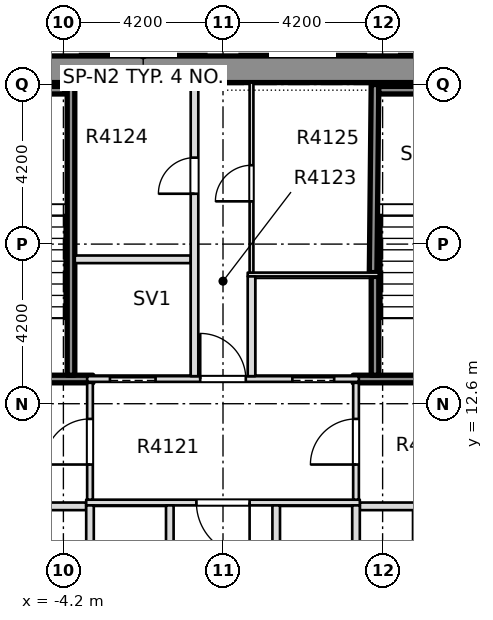
"""IFC4 building model, lengths in metres.
Left out: names, types, materials, properties, quantities, classifications, styles, units other than length and angle.
Written with IfcOpenShell. Run it as: python <this file> out.ifc"""

import sys

from ifc_helpers import new_model, si_unit, direction, frame, frame_2d, origin, place, context, subcontext, project, spatial, rectangle, extrude, element, fill, save


model = new_model("IFC4")
c1 = context("Model", 3, precision=1e-05, world=origin(), true_north=direction((0.0, 1.0)))
c2 = subcontext(c1, "Body", "Model", "MODEL_VIEW")
j1 = project(units=[si_unit("LENGTHUNIT", "METRE"), si_unit("PLANEANGLEUNIT", "RADIAN")], contexts=[c1])
p1 = place(None, origin())
s1 = spatial("IfcSite", under=j1, at=p1, CompositionType="ELEMENT")
p2 = place(p1, origin())
s2 = spatial("IfcBuilding", under=s1, at=p2, CompositionType="ELEMENT")
p3 = place(p2, frame((0.0, 0.0, 160.7)))
s3 = spatial("IfcBuildingStorey", under=s2, at=p3, CompositionType="ELEMENT", Elevation=160.7)
p4 = place(p3, frame((-7.7, 21.4, -0.4), z_axis=(0.0, 0.0, 1.0), x_axis=(1.0, 0.0, 0.0)))
e1 = element("IfcWall", 1, at=p4, inside=s3, PredefinedType="SHEAR", context=c2, shape_type="SweptSolid", body=[
    extrude(rectangle(XDim=15.4, YDim=0.7, at=frame_2d((7.7, 0.0))), origin(), (0.0, 0.0, 1.0), 3.45),
])
p5 = place(p3, frame((-7.699, 9.9, 0.0), z_axis=(0.0, 0.0, 1.0), x_axis=(1.0, 0.0, 0.0)))
e2 = element("IfcWall", 2, at=p5, inside=s3, PredefinedType="PARTITIONING", context=c2, shape_type="SweptSolid", body=[
    extrude(rectangle(XDim=4.099, YDim=0.2, at=frame_2d((2.049, 0.0))), origin(), (0.0, 0.0, 1.0), 3.05),
])
p6 = place(p5, frame((0.749, 0.0, 0.0)))
e3 = element("IfcOpeningElement", 3, at=p6, cuts=e2, PredefinedType="OPENING", context=c2, shape_type="SweptSolid", body=[
    extrude(rectangle(XDim=1.1, YDim=2.1, at=frame_2d((0.55, 1.05))), frame((0.0, 0.11, 0.0), z_axis=(0.0, -1.0, 0.0), x_axis=(1.0, 0.0, 0.0)), (0.0, 0.0, 1.0), 0.22),
])
p7 = place(p3, frame((3.6, 9.9, 0.0), z_axis=(0.0, 0.0, 1.0), x_axis=(1.0, 0.0, 0.0)))
e4 = element("IfcWall", 4, at=p7, inside=s3, PredefinedType="PARTITIONING", context=c2, shape_type="SweptSolid", body=[
    extrude(rectangle(XDim=4.099, YDim=0.2, at=frame_2d((2.049, 0.0))), origin(), (0.0, 0.0, 1.0), 3.05),
])
p8 = place(p7, frame((2.25, 0.0, 0.0)))
e5 = element("IfcOpeningElement", 5, at=p8, cuts=e4, PredefinedType="OPENING", context=c2, shape_type="SweptSolid", body=[
    extrude(rectangle(XDim=1.1, YDim=2.1, at=frame_2d((0.55, 1.05))), frame((0.0, 0.11, 0.0), z_axis=(0.0, -1.0, 0.0), x_axis=(1.0, 0.0, 0.0)), (0.0, 0.0, 1.0), 0.22),
])
p9 = place(p3, frame((-3.6, 10.0, 0.0), z_axis=(0.0, 0.0, 1.0), x_axis=(1.0, 0.0, 0.0)))
e6 = element("IfcWall", 6, at=p9, inside=s3, PredefinedType="PARTITIONING", context=c2, shape_type="SweptSolid", body=[
    extrude(rectangle(XDim=7.2, YDim=0.15, at=frame_2d((3.6, 0.0))), origin(), (0.0, 0.0, 1.0), 3.05),
])
p10 = place(p9, frame((2.9, 0.0, 0.0)))
e7 = element("IfcOpeningElement", 7, at=p10, cuts=e6, PredefinedType="OPENING", context=c2, shape_type="SweptSolid", body=[
    extrude(rectangle(XDim=1.4, YDim=2.1, at=frame_2d((0.7, 1.05))), frame((0.0, 0.085, 0.0), z_axis=(0.0, -1.0, 0.0), x_axis=(1.0, 0.0, 0.0)), (0.0, 0.0, 1.0), 0.17),
])
p11 = place(p3, frame((-7.699, 13.25, 0.0), z_axis=(0.0, 0.0, 1.0), x_axis=(1.0, 0.0, 0.0)))
e8 = element("IfcWall", 8, at=p11, inside=s3, PredefinedType="SOLIDWALL", context=c2, shape_type="SweptSolid", body=[
    extrude(rectangle(XDim=4.274, YDim=0.2, at=frame_2d((2.137, 0.0))), origin(), (0.0, 0.0, 1.0), 3.05),
])
p12 = place(p11, frame((1.249, 0.0, 0.0)))
e9 = element("IfcOpeningElement", 9, at=p12, cuts=e8, PredefinedType="OPENING", context=c2, shape_type="SweptSolid", body=[
    extrude(rectangle(XDim=1.2, YDim=2.1, at=frame_2d((0.6, 1.05))), frame((0.0, 0.11, 0.0), z_axis=(0.0, -1.0, 0.0), x_axis=(1.0, 0.0, 0.0)), (0.0, 0.0, 1.0), 0.22),
])
p13 = place(p3, frame((-3.575, 13.25, 0.0), z_axis=(0.0, 0.0, 1.0), x_axis=(1.0, 0.0, 0.0)))
e10 = element("IfcWall", 10, at=p13, inside=s3, PredefinedType="PARTITIONING", context=c2, shape_type="SweptSolid", body=[
    extrude(rectangle(XDim=7.15, YDim=0.15, at=frame_2d((3.575, 0.0))), origin(), (0.0, 0.0, 1.0), 3.05),
])
p14 = place(p13, frame((0.6, 0.0, 0.0)))
e11 = element("IfcOpeningElement", 11, at=p14, cuts=e10, PredefinedType="OPENING", context=c2, shape_type="SweptSolid", body=[
    extrude(rectangle(XDim=1.2, YDim=2.1, at=frame_2d((0.6, 1.05))), frame((0.0, 0.085, 0.0), z_axis=(0.0, -1.0, 0.0), x_axis=(1.0, 0.0, 0.0)), (0.0, 0.0, 1.0), 0.17),
])
p15 = place(p13, frame((5.4, 0.0, 0.0)))
e12 = element("IfcOpeningElement", 12, at=p15, cuts=e10, PredefinedType="OPENING", context=c2, shape_type="SweptSolid", body=[
    extrude(rectangle(XDim=1.1, YDim=2.1, at=frame_2d((0.55, 1.05))), frame((0.0, 0.085, 0.0), z_axis=(0.0, -1.0, 0.0), x_axis=(1.0, 0.0, 0.0)), (0.0, 0.0, 1.0), 0.17),
])
p16 = place(p13, frame((2.975, 0.0, 0.0)))
e13 = element("IfcOpeningElement", 13, at=p16, cuts=e10, PredefinedType="OPENING", context=c2, shape_type="SweptSolid", body=[
    extrude(rectangle(XDim=1.2, YDim=2.1, at=frame_2d((0.6, 1.05))), frame((0.0, 0.085, 0.0), z_axis=(0.0, -1.0, 0.0), x_axis=(1.0, 0.0, 0.0)), (0.0, 0.0, 1.0), 0.17),
])
p17 = place(p3, frame((3.425, 13.25, 0.0), z_axis=(0.0, 0.0, 1.0), x_axis=(1.0, 0.0, 0.0)))
e14 = element("IfcWall", 14, at=p17, inside=s3, PredefinedType="SOLIDWALL", context=c2, shape_type="SweptSolid", body=[
    extrude(rectangle(XDim=4.274, YDim=0.2, at=frame_2d((2.137, 0.0))), origin(), (0.0, 0.0, 1.0), 3.05),
])
p18 = place(p17, frame((1.825, 0.0, 0.0)))
e15 = element("IfcOpeningElement", 15, at=p18, cuts=e14, PredefinedType="OPENING", context=c2, shape_type="SweptSolid", body=[
    extrude(rectangle(XDim=1.2, YDim=2.1, at=frame_2d((0.6, 1.05))), frame((0.0, 0.11, 0.0), z_axis=(0.0, -1.0, 0.0), x_axis=(1.0, 0.0, 0.0)), (0.0, 0.0, 1.0), 0.22),
])
p19 = place(p3, frame((0.65, 16.0, 0.0), z_axis=(0.0, 0.0, 1.0), x_axis=(1.0, 0.0, 0.0)))
e16 = element("IfcWall", 16, at=p19, inside=s3, PredefinedType="PARTITIONING", context=c2, shape_type="SweptSolid", body=[
    extrude(rectangle(XDim=3.45, YDim=0.1, at=frame_2d((1.725, 0.0))), origin(), (0.0, 0.0, 1.0), 3.05),
])
p20 = place(p3, frame((-3.9, 16.4, 0.0), z_axis=(0.0, 0.0, 1.0), x_axis=(1.0, 0.0, 0.0)))
e17 = element("IfcWall", 17, at=p20, inside=s3, PredefinedType="PARTITIONING", context=c2, shape_type="SweptSolid", body=[
    extrude(rectangle(XDim=3.05, YDim=0.2, at=frame_2d((1.525, 0.0))), origin(), (0.0, 0.0, 1.0), 3.05),
])
p21 = place(p3, frame((-4.0, 13.35, 0.0), z_axis=(0.0, 0.0, 1.0), x_axis=(0.0, 1.0, 0.0)))
e18 = element("IfcWall", 18, at=p21, inside=s3, PredefinedType="SOLIDWALL", context=c2, shape_type="SweptSolid", body=[
    extrude(rectangle(XDim=7.699, YDim=0.2, at=frame_2d((3.85, 0.0))), origin(), (0.0, 0.0, 1.0), 3.05),
])
p22 = place(p3, frame((-3.5, 7.075, 0.0), z_axis=(0.0, 0.0, 1.0), x_axis=(0.0, 1.0, 0.0)))
e19 = element("IfcWall", 19, at=p22, inside=s3, PredefinedType="PARTITIONING", context=c2, shape_type="SweptSolid", body=[
    extrude(rectangle(XDim=2.85, YDim=0.2, at=frame_2d((1.425, 0.0))), origin(), (0.0, 0.0, 1.0), 3.05),
])
p23 = place(p3, frame((-3.5, 10.075, 0.0), z_axis=(0.0, 0.0, 1.0), x_axis=(0.0, 1.0, 0.0)))
e20 = element("IfcWall", 20, at=p23, inside=s3, PredefinedType="PARTITIONING", context=c2, shape_type="SweptSolid", body=[
    extrude(rectangle(XDim=3.075, YDim=0.15, at=frame_2d((1.538, 0.0))), origin(), (0.0, 0.0, 1.0), 3.05),
])
p24 = place(p23, frame((0.925, 0.0, 0.0)))
e21 = element("IfcOpeningElement", 21, at=p24, cuts=e20, PredefinedType="OPENING", context=c2, shape_type="SweptSolid", body=[
    extrude(rectangle(XDim=1.2, YDim=2.1, at=frame_2d((0.6, 1.05))), frame((0.0, 0.085, 0.0), z_axis=(0.0, -1.0, 0.0), x_axis=(1.0, 0.0, 0.0)), (0.0, 0.0, 1.0), 0.17),
])
p25 = place(p3, frame((-1.4, 7.075, 0.0), z_axis=(0.0, 0.0, 1.0), x_axis=(0.0, 1.0, 0.0)))
e22 = element("IfcWall", 22, at=p25, inside=s3, PredefinedType="PARTITIONING", context=c2, shape_type="SweptSolid", body=[
    extrude(rectangle(XDim=2.85, YDim=0.2, at=frame_2d((1.425, 0.0))), origin(), (0.0, 0.0, 1.0), 3.05),
])
p26 = place(p3, frame((-0.75, 13.325, 0.0), z_axis=(0.0, 0.0, 1.0), x_axis=(0.0, 1.0, 0.0)))
e23 = element("IfcWall", 23, at=p26, inside=s3, PredefinedType="PARTITIONING", context=c2, shape_type="SweptSolid", body=[
    extrude(rectangle(XDim=7.724, YDim=0.2, at=frame_2d((3.862, 0.0))), origin(), (0.0, 0.0, 1.0), 3.05),
])
p27 = place(p26, frame((4.8, 0.0, 0.0)))
e24 = element("IfcOpeningElement", 24, at=p27, cuts=e23, PredefinedType="OPENING", context=c2, shape_type="SweptSolid", body=[
    extrude(rectangle(XDim=0.95, YDim=2.1, at=frame_2d((0.475, 1.05))), frame((0.0, 0.11, 0.0), z_axis=(0.0, -1.0, 0.0), x_axis=(1.0, 0.0, 0.0)), (0.0, 0.0, 1.0), 0.22),
])
p28 = place(p3, frame((0.75, 13.325, 0.0), z_axis=(0.0, 0.0, 1.0), x_axis=(0.0, 1.0, 0.0)))
e25 = element("IfcWall", 25, at=p28, inside=s3, PredefinedType="PARTITIONING", context=c2, shape_type="SweptSolid", body=[
    extrude(rectangle(XDim=2.625, YDim=0.2, at=frame_2d((1.312, 0.0))), origin(), (0.0, 0.0, 1.0), 3.05),
])
p29 = place(p3, frame((0.75, 16.05, 0.0), z_axis=(0.0, 0.0, 1.0), x_axis=(0.0, 1.0, 0.0)))
e26 = element("IfcWall", 26, at=p29, inside=s3, PredefinedType="PARTITIONING", context=c2, shape_type="SweptSolid", body=[
    extrude(rectangle(XDim=4.999, YDim=0.1, at=frame_2d((2.5, 0.0))), origin(), (0.0, 0.0, 1.0), 3.05),
])
p30 = place(p29, frame((1.875, 0.0, 0.0)))
e27 = element("IfcOpeningElement", 27, at=p30, cuts=e26, PredefinedType="OPENING", context=c2, shape_type="SweptSolid", body=[
    extrude(rectangle(XDim=0.95, YDim=2.1, at=frame_2d((0.475, 1.05))), frame((0.0, 0.06, 0.0), z_axis=(0.0, -1.0, 0.0), x_axis=(1.0, 0.0, 0.0)), (0.0, 0.0, 1.0), 0.12),
])
for number, where, z_axis, x_axis in (
    (28, (1.4, 7.075, 0.0), (0.0, 0.0, 1.0), (0.0, 1.0, 0.0)),
    (29, (3.5, 7.075, 0.0), (0.0, 0.0, 1.0), (0.0, 1.0, 0.0)),
):
    element("IfcWall", number, at=place(p3, frame(where, z_axis=z_axis, x_axis=x_axis)), inside=s3, PredefinedType="PARTITIONING", context=c2, shape_type="SweptSolid", body=[
        extrude(rectangle(XDim=2.85, YDim=0.2, at=frame_2d((1.425, 0.0))), origin(), (0.0, 0.0, 1.0), 3.05),
    ])
p31 = place(p3, frame((3.5, 10.075, 0.0), z_axis=(0.0, 0.0, 1.0), x_axis=(0.0, 1.0, 0.0)))
e30 = element("IfcWall", 30, at=p31, inside=s3, PredefinedType="PARTITIONING", context=c2, shape_type="SweptSolid", body=[
    extrude(rectangle(XDim=3.075, YDim=0.15, at=frame_2d((1.538, 0.0))), origin(), (0.0, 0.0, 1.0), 3.05),
])
p32 = place(p31, frame((0.925, 0.0, 0.0)))
e31 = element("IfcOpeningElement", 31, at=p32, cuts=e30, PredefinedType="OPENING", context=c2, shape_type="SweptSolid", body=[
    extrude(rectangle(XDim=1.2, YDim=2.1, at=frame_2d((0.6, 1.05))), frame((0.0, 0.085, 0.0), z_axis=(0.0, -1.0, 0.0), x_axis=(1.0, 0.0, 0.0)), (0.0, 0.0, 1.0), 0.17),
])
p33 = place(p3, frame((4.0, 13.35, 0.0), z_axis=(0.0, 0.0, 1.0), x_axis=(0.0, 1.0, 0.0)))
e32 = element("IfcWall", 32, at=p33, inside=s3, PredefinedType="SOLIDWALL", context=c2, shape_type="SweptSolid", body=[
    extrude(rectangle(XDim=2.6, YDim=0.2, at=frame_2d((1.3, 0.0))), origin(), (0.0, 0.0, 1.0), 3.05),
])
p34 = place(p3, frame((3.95, 16.05, 0.0), z_axis=(0.0, 0.0, 1.0), x_axis=(0.010112452169, 0.999948867848, 0.0)))
e33 = element("IfcWall", 33, at=p34, inside=s3, PredefinedType="SOLIDWALL", context=c2, shape_type="SweptSolid", body=[
    extrude(rectangle(XDim=4.949, YDim=0.2, at=frame_2d((2.475, 0.0))), origin(), (0.0, 0.0, 1.0), 3.05),
])
p35 = place(p3, frame((-7.65, 20.85, 0.0), z_axis=(0.0, 0.0, 1.0), x_axis=(1.0, 0.0, 0.0)))
e34 = element("IfcWall", 34, at=p35, inside=s3, PredefinedType="SOLIDWALL", context=c2, shape_type="SweptSolid", body=[
    extrude(rectangle(XDim=3.5, YDim=0.2, at=frame_2d((1.75, 0.0))), origin(), (0.0, 0.0, 1.0), 3.05),
])
p36 = place(p3, frame((4.1, 20.85, 0.0), z_axis=(0.0, 0.0, 1.0), x_axis=(1.0, 0.0, 0.0)))
e35 = element("IfcWall", 35, at=p36, inside=s3, PredefinedType="SOLIDWALL", context=c2, shape_type="SweptSolid", body=[
    extrude(rectangle(XDim=3.55, YDim=0.2, at=frame_2d((1.775, 0.0))), origin(), (0.0, 0.0, 1.0), 3.05),
])
p37 = place(p10, origin())
e36 = element("IfcDoor", 36, at=p37, inside=s3, OperationType="SINGLE_SWING_RIGHT", PredefinedType="DOOR", context=c2, shape_type="SweptSolid", body=[
    extrude(rectangle(XDim=1.4, YDim=2.1, at=frame_2d((0.7, 1.05))), frame((0.0, 0.025, 0.0), z_axis=(0.0, -1.0, 0.0), x_axis=(1.0, 0.0, 0.0)), (0.0, 0.0, 1.0), 0.05),
])
fill(e7, e36)
p38 = place(p14, origin())
e37 = element("IfcDoor", 37, at=p38, inside=s3, OperationType="SLIDING_TO_RIGHT", PredefinedType="DOOR", context=c2, shape_type="SweptSolid", body=[
    extrude(rectangle(XDim=1.2, YDim=2.1, at=frame_2d((0.6, 1.05))), frame((0.0, 0.025, 0.0), z_axis=(0.0, -1.0, 0.0), x_axis=(1.0, 0.0, 0.0)), (0.0, 0.0, 1.0), 0.05),
])
fill(e11, e37)
p39 = place(p15, origin())
e38 = element("IfcDoor", 38, at=p39, inside=s3, OperationType="SLIDING_TO_LEFT", PredefinedType="DOOR", context=c2, shape_type="SweptSolid", body=[
    extrude(rectangle(XDim=1.1, YDim=2.1, at=frame_2d((0.55, 1.05))), frame((0.0, 0.025, 0.0), z_axis=(0.0, -1.0, 0.0), x_axis=(1.0, 0.0, 0.0)), (0.0, 0.0, 1.0), 0.05),
])
fill(e12, e38)
p40 = place(p16, origin())
e39 = element("IfcDoor", 39, at=p40, inside=s3, OperationType="SINGLE_SWING_RIGHT", PredefinedType="DOOR", context=c2, shape_type="SweptSolid", body=[
    extrude(rectangle(XDim=1.2, YDim=2.1, at=frame_2d((0.6, 1.05))), frame((0.0, 0.025, 0.0), z_axis=(0.0, -1.0, 0.0), x_axis=(1.0, 0.0, 0.0)), (0.0, 0.0, 1.0), 0.05),
])
fill(e13, e39)
p41 = place(p27, origin())
e40 = element("IfcDoor", 40, at=p41, inside=s3, OperationType="SINGLE_SWING_RIGHT", PredefinedType="DOOR", context=c2, shape_type="SweptSolid", body=[
    extrude(rectangle(XDim=0.95, YDim=2.1, at=frame_2d((0.475, 1.05))), frame((0.0, 0.025, 0.0), z_axis=(0.0, -1.0, 0.0), x_axis=(1.0, 0.0, 0.0)), (0.0, 0.0, 1.0), 0.05),
])
fill(e24, e40)
p42 = place(p30, origin())
e41 = element("IfcDoor", 41, at=p42, inside=s3, OperationType="SINGLE_SWING_LEFT", PredefinedType="DOOR", context=c2, shape_type="SweptSolid", body=[
    extrude(rectangle(XDim=0.95, YDim=2.1, at=frame_2d((0.475, 1.05))), frame((0.0, 0.025, 0.0), z_axis=(0.0, -1.0, 0.0), x_axis=(1.0, 0.0, 0.0)), (0.0, 0.0, 1.0), 0.05),
])
fill(e27, e41)
p43 = place(p24, origin())
e42 = element("IfcDoor", 42, at=p43, inside=s3, OperationType="SINGLE_SWING_RIGHT", PredefinedType="DOOR", context=c2, shape_type="SweptSolid", body=[
    extrude(rectangle(XDim=1.2, YDim=2.1, at=frame_2d((0.6, 1.05))), frame((0.0, 0.025, 0.0), z_axis=(0.0, -1.0, 0.0), x_axis=(1.0, 0.0, 0.0)), (0.0, 0.0, 1.0), 0.05),
])
fill(e21, e42)
p44 = place(p32, origin())
e43 = element("IfcDoor", 43, at=p44, inside=s3, OperationType="SINGLE_SWING_LEFT", PredefinedType="DOOR", context=c2, shape_type="SweptSolid", body=[
    extrude(rectangle(XDim=1.2, YDim=2.1, at=frame_2d((0.6, 1.05))), frame((0.0, 0.025, 0.0), z_axis=(0.0, -1.0, 0.0), x_axis=(1.0, 0.0, 0.0)), (0.0, 0.0, 1.0), 0.05),
])
fill(e31, e43)
save(model, sys.argv[1])
